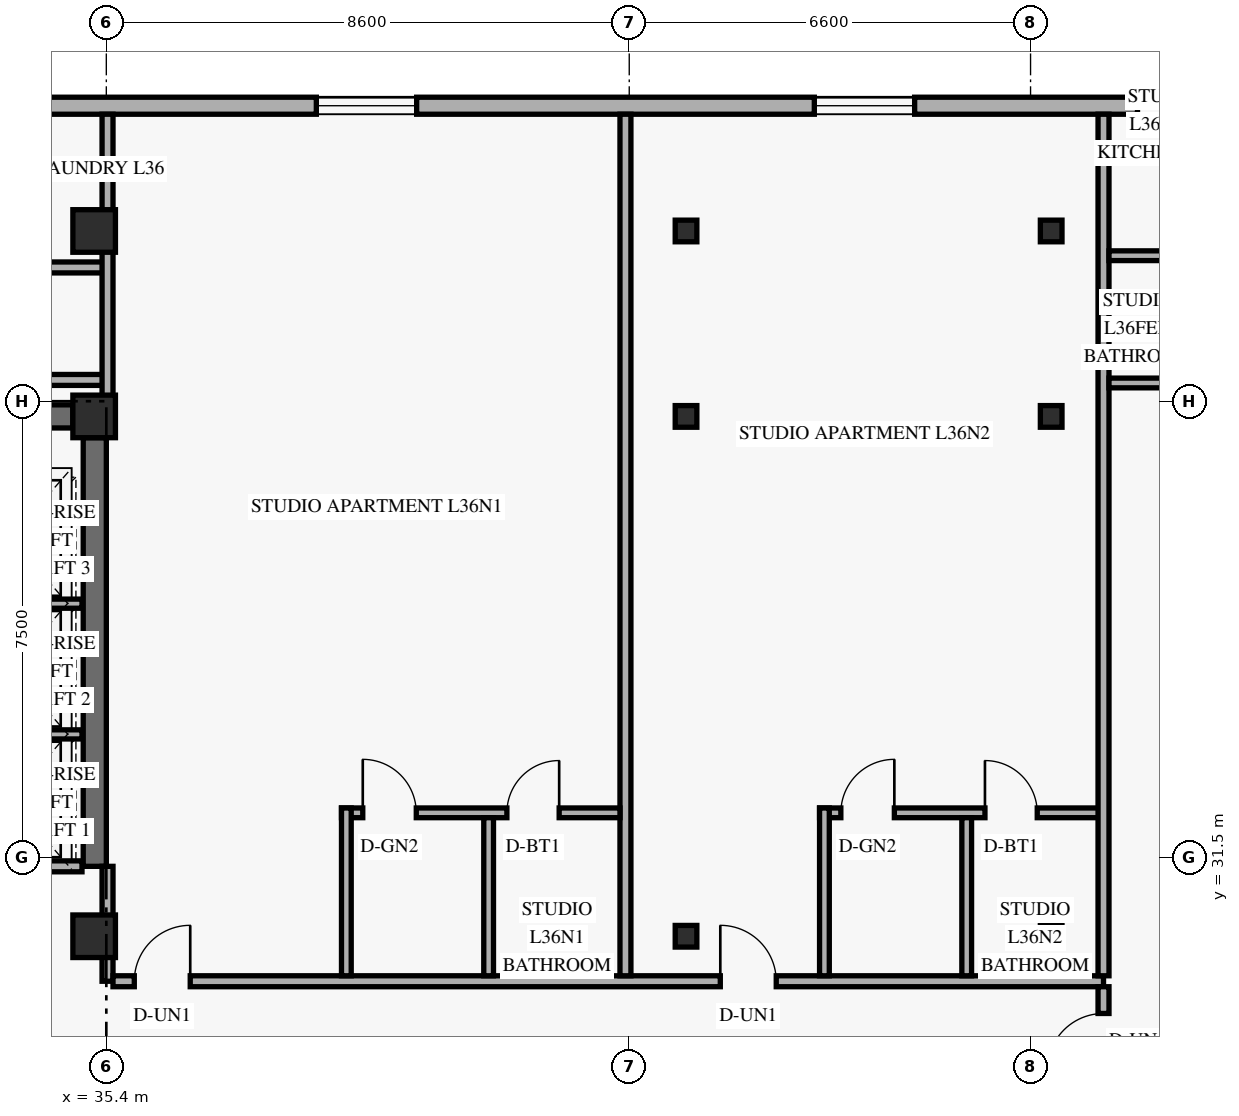
"""IFC4 building model, lengths in metres.
Left out: names, types, materials, properties, quantities, classifications, styles, units other than length and angle.
Written with IfcOpenShell. Run it as: python <this file> out.ifc"""

import sys

from ifc_helpers import new_model, si_unit, direction, frame, frame_2d, origin, origin_2d, place, context, subcontext, project, spatial, rectangle, hollow_rectangle, extrude, element, fill, save


model = new_model("IFC4")
c1 = context("Model", 3, precision=1e-05, world=origin(), true_north=direction((0.0, 1.0)))
c2 = subcontext(c1, "Body", "Model", "MODEL_VIEW")
j1 = project(units=[si_unit("LENGTHUNIT", "METRE"), si_unit("PLANEANGLEUNIT", "RADIAN")], contexts=[c1])
p1 = place(None, origin())
s1 = spatial("IfcSite", under=j1, at=p1, CompositionType="ELEMENT")
p2 = place(p1, origin())
s2 = spatial("IfcBuilding", under=s1, at=p2, CompositionType="ELEMENT")
p3 = place(p2, frame((0.0, 0.0, 141.0)))
s3 = spatial("IfcBuildingStorey", under=s2, at=p3, CompositionType="ELEMENT", Elevation=141.0)
p4 = place(p3, frame((35.21, 31.35, 0.0), z_axis=(0.0, 0.0, 1.0), x_axis=(0.0, 1.0, 0.0)))
e1 = element("IfcWall", 1, at=p4, inside=s3, PredefinedType="SHEAR", context=c2, shape_type="SweptSolid", body=[
    extrude(rectangle(XDim=7.05, YDim=0.38, at=frame_2d((3.525, 0.0))), origin(), (0.0, 0.0, 1.0), 2.748),
])
p5 = place(p3, frame((24.55, 38.75, 0.0), z_axis=(0.0, 0.0, 1.0), x_axis=(1.0, 0.0, 0.0)))
e2 = element("IfcWall", 2, at=p5, inside=s3, PredefinedType="SHEAR", context=c2, shape_type="SweptSolid", body=[
    extrude(rectangle(XDim=10.3, YDim=0.38, at=frame_2d((5.15, 0.0))), origin(), (0.0, 0.0, 1.0), 3.36),
])
p6 = place(p5, frame((5.2, 0.0, 0.0)))
e3 = element("IfcOpeningElement", 3, at=p6, cuts=e2, PredefinedType="OPENING", context=c2, shape_type="SweptSolid", body=[
    extrude(rectangle(XDim=1.05, YDim=2.15, at=frame_2d((0.525, 1.075))), frame((0.0, 0.2, 0.0), z_axis=(0.0, -1.0, 0.0), x_axis=(1.0, 0.0, 0.0)), (0.0, 0.0, 1.0), 0.4),
])
for number, where, z_axis, x_axis in (
    (4, (35.2, 30.2, 0.0), (0.0, 0.0, 1.0), (1.0, 0.0, 0.0)),
    (5, (35.2, 38.75, 0.0), (0.0, 0.0, 1.0), (1.0, 0.0, 0.0)),
    (6, (35.2, 41.8, 0.0), (0.0, 0.0, 1.0), (1.0, 0.0, 0.0)),
):
    element("IfcColumn", number, at=place(p3, frame(where, z_axis=z_axis, x_axis=x_axis)), inside=s3, PredefinedType="COLUMN", context=c2, shape_type="SweptSolid", body=[
        extrude(rectangle(XDim=0.7, YDim=0.7, at=origin_2d()), origin(), (0.0, 0.0, 1.0), 3.6),
    ])
for number, where, z_axis, x_axis in (
    (7, (44.871, 30.2, 0.0), (0.035, 0.0, 0.999), (0.0, 1.0, 0.0)),
    (8, (44.871, 38.75, 0.0), (0.035, 0.0, 0.999), (0.0, 1.0, 0.0)),
    (9, (44.871, 41.8, 0.0), (0.035, 0.0, 0.999), (0.0, 1.0, 0.0)),
):
    element("IfcColumn", number, at=place(p3, frame(where, z_axis=z_axis, x_axis=x_axis)), inside=s3, PredefinedType="COLUMN", context=c2, shape_type="SweptSolid", body=[
        extrude(hollow_rectangle(XDim=0.356, YDim=0.356, WallThickness=0.016, at=origin_2d()), origin(), (0.0, 0.0, 1.0), 3.602),
    ])
for number, where, z_axis, x_axis in (
    (10, (50.835, 30.2, 0.0), (0.058, 0.0, 0.998), (0.0, 1.0, 0.0)),
    (11, (50.835, 38.75, 0.0), (0.058, 0.0, 0.998), (0.0, 1.0, 0.0)),
    (12, (50.835, 41.8, 0.0), (0.058, 0.0, 0.998), (0.0, 1.0, 0.0)),
):
    element("IfcColumn", number, at=place(p3, frame(where, z_axis=z_axis, x_axis=x_axis)), inside=s3, PredefinedType="COLUMN", context=c2, shape_type="SweptSolid", body=[
        extrude(hollow_rectangle(XDim=0.356, YDim=0.356, WallThickness=0.016, at=origin_2d()), origin(), (0.0, 0.0, 1.0), 3.606),
    ])
p7 = place(p3, frame((54.98, 43.86, 0.0), z_axis=(0.0, 0.0, 1.0), x_axis=(-1.0, 0.0, 0.0)))
e13 = element("IfcWall", 13, at=p7, inside=s3, PredefinedType="SOLIDWALL", context=c2, shape_type="SweptSolid", body=[
    extrude(rectangle(XDim=33.76, YDim=0.28, at=frame_2d((16.88, 0.0))), origin(), (0.0, 0.0, 1.0), 3.36),
])
p8 = place(p7, frame((28.555, 0.0, 0.85)))
e14 = element("IfcOpeningElement", 14, at=p8, cuts=e13, PredefinedType="OPENING", context=c2, shape_type="SweptSolid", body=[
    extrude(rectangle(XDim=1.65, YDim=1.6, at=frame_2d((0.825, 0.8))), frame((0.0, 0.15, 0.0), z_axis=(0.0, -1.0, 0.0), x_axis=(1.0, 0.0, 0.0)), (0.0, 0.0, 1.0), 0.3),
])
p9 = place(p7, frame((21.67, 0.0, 0.85)))
e15 = element("IfcOpeningElement", 15, at=p9, cuts=e13, PredefinedType="OPENING", context=c2, shape_type="SweptSolid", body=[
    extrude(rectangle(XDim=1.65, YDim=1.6, at=frame_2d((0.825, 0.8))), frame((0.0, 0.15, 0.0), z_axis=(0.0, -1.0, 0.0), x_axis=(1.0, 0.0, 0.0)), (0.0, 0.0, 1.0), 0.3),
])
p10 = place(p7, frame((14.476, 0.0, 0.85)))
e16 = element("IfcOpeningElement", 16, at=p10, cuts=e13, PredefinedType="OPENING", context=c2, shape_type="SweptSolid", body=[
    extrude(rectangle(XDim=1.65, YDim=1.6, at=frame_2d((0.825, 0.8))), frame((0.0, 0.15, 0.0), z_axis=(0.0, -1.0, 0.0), x_axis=(1.0, 0.0, 0.0)), (0.0, 0.0, 1.0), 0.3),
])
p11 = place(p7, frame((6.286, 0.0, 0.85)))
e17 = element("IfcOpeningElement", 17, at=p11, cuts=e13, PredefinedType="OPENING", context=c2, shape_type="SweptSolid", body=[
    extrude(rectangle(XDim=1.65, YDim=1.6, at=frame_2d((0.825, 0.8))), frame((0.0, 0.15, 0.0), z_axis=(0.0, -1.0, 0.0), x_axis=(1.0, 0.0, 0.0)), (0.0, 0.0, 1.0), 0.3),
])
p12 = place(p7, frame((0.971, 0.0, 0.85)))
e18 = element("IfcOpeningElement", 18, at=p12, cuts=e13, PredefinedType="OPENING", context=c2, shape_type="SweptSolid", body=[
    extrude(rectangle(XDim=1.65, YDim=1.6, at=frame_2d((0.825, 0.8))), frame((0.0, 0.15, 0.0), z_axis=(0.0, -1.0, 0.0), x_axis=(1.0, 0.0, 0.0)), (0.0, 0.0, 1.0), 0.3),
])
p13 = place(p3, frame((32.74, 31.35, 0.0), z_axis=(0.0, 0.0, 1.0), x_axis=(1.0, 0.0, 0.0)))
e19 = element("IfcWall", 19, at=p13, inside=s3, PredefinedType="STANDARD", context=c2, shape_type="SweptSolid", body=[
    extrude(rectangle(XDim=2.26, YDim=0.18, at=frame_2d((1.13, 0.0))), origin(), (0.0, 0.0, 1.0), 3.36),
])
for number, where, z_axis, x_axis in (
    (20, (32.74, 33.52, 0.0), (0.0, 0.0, 1.0), (1.0, 0.0, 0.0)),
    (21, (32.74, 35.67, 0.0), (0.0, 0.0, 1.0), (1.0, 0.0, 0.0)),
):
    element("IfcWall", number, at=place(p3, frame(where, z_axis=z_axis, x_axis=x_axis)), inside=s3, PredefinedType="STANDARD", context=c2, shape_type="SweptSolid", body=[
        extrude(rectangle(XDim=2.26, YDim=0.15, at=frame_2d((1.13, 0.0))), origin(), (0.0, 0.0, 1.0), 3.36),
    ])
p14 = place(p3, frame((35.42, 29.46, 0.0), z_axis=(0.0, 0.0, 1.0), x_axis=(0.0, 1.0, 0.0)))
e22 = element("IfcWall", 22, at=p14, inside=s3, PredefinedType="STANDARD", context=c2, shape_type="SweptSolid", body=[
    extrude(rectangle(XDim=1.89, YDim=0.18, at=frame_2d((0.945, 0.0))), origin(), (0.0, 0.0, 1.0), 2.73),
])
p15 = place(p3, frame((35.51, 29.46, 0.0), z_axis=(0.0, 0.0, 1.0), x_axis=(1.0, 0.0, 0.0)))
e23 = element("IfcWall", 23, at=p15, inside=s3, PredefinedType="STANDARD", context=c2, shape_type="SweptSolid", body=[
    extrude(rectangle(XDim=16.29, YDim=0.18, at=frame_2d((8.145, 0.0))), origin(), (0.0, 0.0, 1.0), 2.73),
])
p16 = place(p15, frame((0.35, 0.0, 0.0)))
e24 = element("IfcOpeningElement", 24, at=p16, cuts=e23, PredefinedType="OPENING", context=c2, shape_type="SweptSolid", body=[
    extrude(rectangle(XDim=0.92, YDim=2.15, at=frame_2d((0.46, 1.075))), frame((0.0, 0.1, 0.0), z_axis=(0.0, -1.0, 0.0), x_axis=(1.0, 0.0, 0.0)), (0.0, 0.0, 1.0), 0.2),
])
p17 = place(p15, frame((9.988, 0.0, 0.0)))
e25 = element("IfcOpeningElement", 25, at=p17, cuts=e23, PredefinedType="OPENING", context=c2, shape_type="SweptSolid", body=[
    extrude(rectangle(XDim=0.92, YDim=2.15, at=frame_2d((0.46, 1.075))), frame((0.0, 0.1, 0.0), z_axis=(0.0, -1.0, 0.0), x_axis=(1.0, 0.0, 0.0)), (0.0, 0.0, 1.0), 0.2),
])
p18 = place(p3, frame((21.74, 41.2, 0.0), z_axis=(0.0, 0.0, 1.0), x_axis=(1.0, 0.0, 0.0)))
e26 = element("IfcWall", 26, at=p18, inside=s3, PredefinedType="STANDARD", context=c2, shape_type="SweptSolid", body=[
    extrude(rectangle(XDim=13.68, YDim=0.18, at=frame_2d((6.84, 0.0))), origin(), (0.0, 0.0, 1.0), 2.73),
])
p19 = place(p18, frame((2.95, 0.0, 0.0)))
e27 = element("IfcOpeningElement", 27, at=p19, cuts=e26, PredefinedType="OPENING", context=c2, shape_type="SweptSolid", body=[
    extrude(rectangle(XDim=0.95, YDim=2.15, at=frame_2d((0.475, 1.075))), frame((0.0, 0.1, 0.0), z_axis=(0.0, -1.0, 0.0), x_axis=(1.0, 0.0, 0.0)), (0.0, 0.0, 1.0), 0.2),
])
p20 = place(p18, frame((10.11, 0.0, 0.0)))
e28 = element("IfcOpeningElement", 28, at=p20, cuts=e26, PredefinedType="OPENING", context=c2, shape_type="SweptSolid", body=[
    extrude(rectangle(XDim=0.95, YDim=2.15, at=frame_2d((0.475, 1.075))), frame((0.0, 0.1, 0.0), z_axis=(0.0, -1.0, 0.0), x_axis=(1.0, 0.0, 0.0)), (0.0, 0.0, 1.0), 0.2),
])
p21 = place(p3, frame((23.85, 39.35, 0.0), z_axis=(0.0, 0.0, 1.0), x_axis=(1.0, 0.0, 0.0)))
e29 = element("IfcWall", 29, at=p21, inside=s3, PredefinedType="STANDARD", context=c2, shape_type="SweptSolid", body=[
    extrude(rectangle(XDim=11.57, YDim=0.18, at=frame_2d((5.785, 0.0))), origin(), (0.0, 0.0, 1.0), 2.73),
])
p22 = place(p3, frame((35.42, 38.75, 0.0), z_axis=(0.0, 0.0, 1.0), x_axis=(0.0, 1.0, 0.0)))
e30 = element("IfcWall", 30, at=p22, inside=s3, PredefinedType="PARTITIONING", context=c2, shape_type="SweptSolid", body=[
    extrude(rectangle(XDim=4.97, YDim=0.18, at=frame_2d((2.485, 0.0))), origin(), (0.0, 0.0, 1.0), 2.73),
])
p23 = place(p3, frame((43.938, 29.55, 0.0), z_axis=(0.0, 0.0, 1.0), x_axis=(0.0, 1.0, 0.0)))
e31 = element("IfcWall", 31, at=p23, inside=s3, PredefinedType="PARTITIONING", context=c2, shape_type="SweptSolid", body=[
    extrude(rectangle(XDim=14.17, YDim=0.18, at=frame_2d((7.085, 0.0))), origin(), (0.0, 0.0, 1.0), 2.73),
])
p24 = place(p3, frame((39.268, 32.23, 0.0), z_axis=(0.0, 0.0, 1.0), x_axis=(1.0, 0.0, 0.0)))
e32 = element("IfcWall", 32, at=p24, inside=s3, PredefinedType="PLUMBINGWALL", context=c2, shape_type="SweptSolid", body=[
    extrude(rectangle(XDim=4.58, YDim=0.16, at=frame_2d((2.29, 0.0))), origin(), (0.0, 0.0, 1.0), 3.36),
])
p25 = place(p24, frame((0.35, 0.0, 0.0)))
e33 = element("IfcOpeningElement", 33, at=p25, cuts=e32, PredefinedType="OPENING", context=c2, shape_type="SweptSolid", body=[
    extrude(rectangle(XDim=0.88, YDim=2.12, at=frame_2d((0.44, 1.06))), frame((0.0, 0.09, 0.0), z_axis=(0.0, -1.0, 0.0), x_axis=(1.0, 0.0, 0.0)), (0.0, 0.0, 1.0), 0.18),
])
p26 = place(p24, frame((2.72, 0.0, 0.0)))
e34 = element("IfcOpeningElement", 34, at=p26, cuts=e32, PredefinedType="OPENING", context=c2, shape_type="SweptSolid", body=[
    extrude(rectangle(XDim=0.86, YDim=2.12, at=frame_2d((0.43, 1.06))), frame((0.0, 0.09, 0.0), z_axis=(0.0, -1.0, 0.0), x_axis=(1.0, 0.0, 0.0)), (0.0, 0.0, 1.0), 0.18),
])
p27 = place(p3, frame((39.348, 29.55, 0.0), z_axis=(0.0, 0.0, 1.0), x_axis=(0.0, 1.0, 0.0)))
e35 = element("IfcWall", 35, at=p27, inside=s3, PredefinedType="PLUMBINGWALL", context=c2, shape_type="SweptSolid", body=[
    extrude(rectangle(XDim=2.76, YDim=0.16, at=frame_2d((1.38, 0.0))), origin(), (0.0, 0.0, 1.0), 2.73),
])
p28 = place(p3, frame((41.688, 29.55, 0.0), z_axis=(0.0, 0.0, 1.0), x_axis=(0.0, 1.0, 0.0)))
e36 = element("IfcWall", 36, at=p28, inside=s3, PredefinedType="PLUMBINGWALL", context=c2, shape_type="SweptSolid", body=[
    extrude(rectangle(XDim=2.6, YDim=0.16, at=frame_2d((1.3, 0.0))), origin(), (0.0, 0.0, 1.0), 2.73),
])
p29 = place(p3, frame((47.13, 32.23, 0.0), z_axis=(0.0, 0.0, 1.0), x_axis=(1.0, 0.0, 0.0)))
e37 = element("IfcWall", 37, at=p29, inside=s3, PredefinedType="PLUMBINGWALL", context=c2, shape_type="SweptSolid", body=[
    extrude(rectangle(XDim=4.67, YDim=0.16, at=frame_2d((2.335, 0.0))), origin(), (0.0, 0.0, 1.0), 2.879),
])
p30 = place(p29, frame((0.35, 0.0, 0.0)))
e38 = element("IfcOpeningElement", 38, at=p30, cuts=e37, PredefinedType="OPENING", context=c2, shape_type="SweptSolid", body=[
    extrude(rectangle(XDim=0.88, YDim=2.12, at=frame_2d((0.44, 1.06))), frame((0.0, 0.09, 0.0), z_axis=(0.0, -1.0, 0.0), x_axis=(1.0, 0.0, 0.0)), (0.0, 0.0, 1.0), 0.18),
])
p31 = place(p29, frame((2.72, 0.0, 0.0)))
e39 = element("IfcOpeningElement", 39, at=p31, cuts=e37, PredefinedType="OPENING", context=c2, shape_type="SweptSolid", body=[
    extrude(rectangle(XDim=0.86, YDim=2.12, at=frame_2d((0.43, 1.06))), frame((0.0, 0.09, 0.0), z_axis=(0.0, -1.0, 0.0), x_axis=(1.0, 0.0, 0.0)), (0.0, 0.0, 1.0), 0.18),
])
p32 = place(p3, frame((47.21, 29.55, 0.0), z_axis=(0.0, 0.0, 1.0), x_axis=(0.0, 1.0, 0.0)))
e40 = element("IfcWall", 40, at=p32, inside=s3, PredefinedType="PLUMBINGWALL", context=c2, shape_type="SweptSolid", body=[
    extrude(rectangle(XDim=2.76, YDim=0.16, at=frame_2d((1.38, 0.0))), origin(), (0.0, 0.0, 1.0), 2.73),
])
p33 = place(p3, frame((49.55, 29.55, 0.0), z_axis=(0.0, 0.0, 1.0), x_axis=(0.0, 1.0, 0.0)))
e41 = element("IfcWall", 41, at=p33, inside=s3, PredefinedType="PLUMBINGWALL", context=c2, shape_type="SweptSolid", body=[
    extrude(rectangle(XDim=2.6, YDim=0.16, at=frame_2d((1.3, 0.0))), origin(), (0.0, 0.0, 1.0), 2.73),
])
p34 = place(p3, frame((51.8, 27.65, 0.0), z_axis=(0.0, 0.0, 1.0), x_axis=(0.0, 1.0, 0.0)))
e42 = element("IfcWall", 42, at=p34, inside=s3, PredefinedType="STANDARD", context=c2, shape_type="SweptSolid", body=[
    extrude(rectangle(XDim=1.72, YDim=0.18, at=frame_2d((0.86, 0.0))), origin(), (0.0, 0.0, 1.0), 3.36),
])
p35 = place(p34, frame((0.36, 0.0, 0.0)))
e43 = element("IfcOpeningElement", 43, at=p35, cuts=e42, PredefinedType="OPENING", context=c2, shape_type="SweptSolid", body=[
    extrude(rectangle(XDim=0.92, YDim=2.15, at=frame_2d((0.46, 1.075))), frame((0.0, 0.1, 0.0), z_axis=(0.0, -1.0, 0.0), x_axis=(1.0, 0.0, 0.0)), (0.0, 0.0, 1.0), 0.2),
])
p36 = place(p3, frame((51.8, 29.55, 0.0), z_axis=(0.0, 0.0, 1.0), x_axis=(0.0, 1.0, 0.0)))
e44 = element("IfcWall", 44, at=p36, inside=s3, PredefinedType="PARTITIONING", context=c2, shape_type="SweptSolid", body=[
    extrude(rectangle(XDim=14.17, YDim=0.18, at=frame_2d((7.085, 0.0))), origin(), (0.0, 0.0, 1.0), 3.36),
])
p37 = place(p3, frame((51.89, 39.3, 0.0), z_axis=(0.0, 0.0, 1.0), x_axis=(1.0, 0.0, 0.0)))
e45 = element("IfcWall", 45, at=p37, inside=s3, PredefinedType="PLUMBINGWALL", context=c2, shape_type="SweptSolid", body=[
    extrude(rectangle(XDim=2.758, YDim=0.16, at=frame_2d((1.379, 0.0))), origin(), (0.0, 0.0, 1.0), 3.36),
])
p38 = place(p3, frame((51.89, 41.393, 0.0), z_axis=(0.0, 0.0, 1.0), x_axis=(1.0, 0.0, 0.0)))
e46 = element("IfcWall", 46, at=p38, inside=s3, PredefinedType="PLUMBINGWALL", context=c2, shape_type="SweptSolid", body=[
    extrude(rectangle(XDim=2.598, YDim=0.16, at=frame_2d((1.299, 0.0))), origin(), (0.0, 0.0, 1.0), 3.36),
])
p39 = place(p10, origin())
e47 = element("IfcWindow", 47, at=p39, inside=s3, PartitioningType="SINGLE_PANEL", PredefinedType="WINDOW", context=c2, shape_type="SweptSolid", body=[
    extrude(rectangle(XDim=1.65, YDim=1.6, at=frame_2d((0.825, 0.8))), frame((0.0, 0.03, 0.0), z_axis=(0.0, -1.0, 0.0), x_axis=(1.0, 0.0, 0.0)), (0.0, 0.0, 1.0), 0.06),
])
fill(e16, e47)
p40 = place(p11, origin())
e48 = element("IfcWindow", 48, at=p40, inside=s3, PartitioningType="SINGLE_PANEL", PredefinedType="WINDOW", context=c2, shape_type="SweptSolid", body=[
    extrude(rectangle(XDim=1.65, YDim=1.6, at=frame_2d((0.825, 0.8))), frame((0.0, 0.03, 0.0), z_axis=(0.0, -1.0, 0.0), x_axis=(1.0, 0.0, 0.0)), (0.0, 0.0, 1.0), 0.06),
])
fill(e17, e48)
p41 = place(p12, origin())
e49 = element("IfcWindow", 49, at=p41, inside=s3, PartitioningType="SINGLE_PANEL", PredefinedType="WINDOW", context=c2, shape_type="SweptSolid", body=[
    extrude(rectangle(XDim=1.65, YDim=1.6, at=frame_2d((0.825, 0.8))), frame((0.0, 0.03, 0.0), z_axis=(0.0, -1.0, 0.0), x_axis=(1.0, 0.0, 0.0)), (0.0, 0.0, 1.0), 0.06),
])
fill(e18, e49)
p42 = place(p16, origin())
e50 = element("IfcDoor", 50, at=p42, inside=s3, OperationType="SINGLE_SWING_RIGHT", PredefinedType="DOOR", context=c2, shape_type="SweptSolid", body=[
    extrude(rectangle(XDim=0.92, YDim=2.15, at=frame_2d((0.46, 1.075))), frame((0.0, 0.025, 0.0), z_axis=(0.0, -1.0, 0.0), x_axis=(1.0, 0.0, 0.0)), (0.0, 0.0, 1.0), 0.05),
])
fill(e24, e50)
p43 = place(p25, origin())
e51 = element("IfcDoor", 51, at=p43, inside=s3, OperationType="SINGLE_SWING_LEFT", PredefinedType="DOOR", context=c2, shape_type="SweptSolid", body=[
    extrude(rectangle(XDim=0.88, YDim=2.12, at=frame_2d((0.44, 1.06))), frame((0.0, 0.025, 0.0), z_axis=(0.0, -1.0, 0.0), x_axis=(1.0, 0.0, 0.0)), (0.0, 0.0, 1.0), 0.05),
])
fill(e33, e51)
p44 = place(p26, origin())
e52 = element("IfcDoor", 52, at=p44, inside=s3, OperationType="SINGLE_SWING_RIGHT", PredefinedType="DOOR", context=c2, shape_type="SweptSolid", body=[
    extrude(rectangle(XDim=0.86, YDim=2.12, at=frame_2d((0.43, 1.06))), frame((0.0, 0.025, 0.0), z_axis=(0.0, -1.0, 0.0), x_axis=(1.0, 0.0, 0.0)), (0.0, 0.0, 1.0), 0.05),
])
fill(e34, e52)
p45 = place(p17, origin())
e53 = element("IfcDoor", 53, at=p45, inside=s3, OperationType="SINGLE_SWING_LEFT", PredefinedType="DOOR", context=c2, shape_type="SweptSolid", body=[
    extrude(rectangle(XDim=0.92, YDim=2.15, at=frame_2d((0.46, 1.075))), frame((0.0, 0.025, 0.0), z_axis=(0.0, -1.0, 0.0), x_axis=(1.0, 0.0, 0.0)), (0.0, 0.0, 1.0), 0.05),
])
fill(e25, e53)
p46 = place(p30, origin())
e54 = element("IfcDoor", 54, at=p46, inside=s3, OperationType="SINGLE_SWING_RIGHT", PredefinedType="DOOR", context=c2, shape_type="SweptSolid", body=[
    extrude(rectangle(XDim=0.88, YDim=2.12, at=frame_2d((0.44, 1.06))), frame((0.0, 0.025, 0.0), z_axis=(0.0, -1.0, 0.0), x_axis=(1.0, 0.0, 0.0)), (0.0, 0.0, 1.0), 0.05),
])
fill(e38, e54)
p47 = place(p31, origin())
e55 = element("IfcDoor", 55, at=p47, inside=s3, OperationType="SINGLE_SWING_LEFT", PredefinedType="DOOR", context=c2, shape_type="SweptSolid", body=[
    extrude(rectangle(XDim=0.86, YDim=2.12, at=frame_2d((0.43, 1.06))), frame((0.0, 0.025, 0.0), z_axis=(0.0, -1.0, 0.0), x_axis=(1.0, 0.0, 0.0)), (0.0, 0.0, 1.0), 0.05),
])
fill(e39, e55)
p48 = place(p35, origin())
e56 = element("IfcDoor", 56, at=p48, inside=s3, OperationType="SINGLE_SWING_LEFT", PredefinedType="DOOR", context=c2, shape_type="SweptSolid", body=[
    extrude(rectangle(XDim=0.92, YDim=2.15, at=frame_2d((0.46, 1.075))), frame((0.0, 0.025, 0.0), z_axis=(0.0, -1.0, 0.0), x_axis=(1.0, 0.0, 0.0)), (0.0, 0.0, 1.0), 0.05),
])
fill(e43, e56)
save(model, sys.argv[1])
